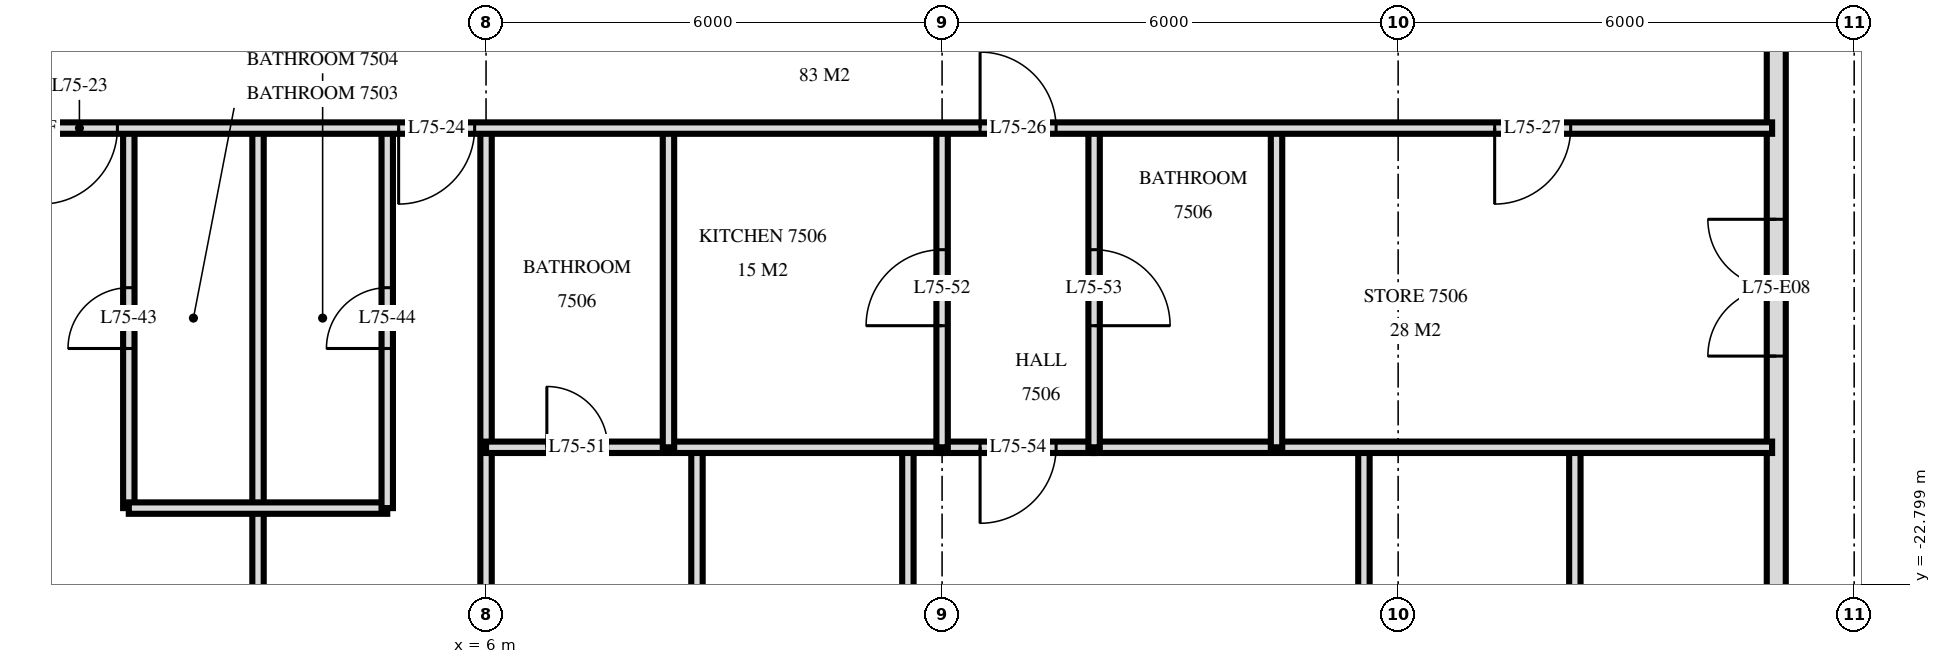
"""IFC4 building model, lengths in metres.
Left out: names, types, materials, properties, quantities, classifications, styles, units other than length and angle.
Written with IfcOpenShell. Run it as: python <this file> out.ifc"""

import sys

from ifc_helpers import new_model, si_unit, direction, frame, frame_2d, origin, place, context, subcontext, project, spatial, rectangle, extrude, element, fill, save


model = new_model("IFC4")
c1 = context("Model", 3, precision=1e-05, world=origin(), true_north=direction((0.0, 1.0)))
c2 = subcontext(c1, "Body", "Model", "MODEL_VIEW")
j1 = project(units=[si_unit("LENGTHUNIT", "METRE"), si_unit("PLANEANGLEUNIT", "RADIAN")], contexts=[c1])
p1 = place(None, origin())
s1 = spatial("IfcSite", under=j1, at=p1, CompositionType="ELEMENT")
p2 = place(p1, origin())
s2 = spatial("IfcBuilding", under=s1, at=p2, CompositionType="ELEMENT")
p3 = place(p2, frame((0.0, 0.0, 284.1)))
s3 = spatial("IfcBuildingStorey", under=s2, at=p3, CompositionType="ELEMENT", Elevation=284.1)
p4 = place(p3, frame((22.975, -29.275, 0.0), z_axis=(0.0, 0.0, 1.0), x_axis=(0.0, 1.0, 0.0)))
e1 = element("IfcWall", 1, at=p4, inside=s3, PredefinedType="SOLIDWALL", context=c2, shape_type="SweptSolid", body=[
    extrude(rectangle(XDim=25.951, YDim=0.25, at=frame_2d((12.975, 0.0))), origin(), (0.0, 0.0, 1.0), 3.22),
])
p5 = place(p4, frame((0.575, 0.0, 0.0)))
e2 = element("IfcOpeningElement", 2, at=p5, cuts=e1, PredefinedType="OPENING", context=c2, shape_type="SweptSolid", body=[
    extrude(rectangle(XDim=1.8, YDim=2.4, at=frame_2d((0.9, 1.2))), frame((0.0, 0.135, 0.0), z_axis=(0.0, -1.0, 0.0), x_axis=(1.0, 0.0, 0.0)), (0.0, 0.0, 1.0), 0.27),
])
p6 = place(p4, frame((3.325, 0.0, 0.9)))
e3 = element("IfcOpeningElement", 3, at=p6, cuts=e1, PredefinedType="OPENING", context=c2, shape_type="SweptSolid", body=[
    extrude(rectangle(XDim=1.8, YDim=1.5, at=frame_2d((0.9, 0.75))), frame((0.0, 0.135, 0.0), z_axis=(0.0, -1.0, 0.0), x_axis=(1.0, 0.0, 0.0)), (0.0, 0.0, 1.0), 0.27),
])
p7 = place(p4, frame((9.475, 0.0, 0.0)))
e4 = element("IfcOpeningElement", 4, at=p7, cuts=e1, PredefinedType="OPENING", context=c2, shape_type="SweptSolid", body=[
    extrude(rectangle(XDim=1.8, YDim=2.4, at=frame_2d((0.9, 1.2))), frame((0.0, 0.135, 0.0), z_axis=(0.0, -1.0, 0.0), x_axis=(1.0, 0.0, 0.0)), (0.0, 0.0, 1.0), 0.27),
])
p8 = place(p4, frame((16.175, 0.0, 0.0)))
e5 = element("IfcOpeningElement", 5, at=p8, cuts=e1, PredefinedType="OPENING", context=c2, shape_type="SweptSolid", body=[
    extrude(rectangle(XDim=1.8, YDim=2.4, at=frame_2d((0.9, 1.2))), frame((0.0, 0.135, 0.0), z_axis=(0.0, -1.0, 0.0), x_axis=(1.0, 0.0, 0.0)), (0.0, 0.0, 1.0), 0.27),
])
p9 = place(p4, frame((22.675, 0.0, 0.0)))
e6 = element("IfcOpeningElement", 6, at=p9, cuts=e1, PredefinedType="OPENING", context=c2, shape_type="SweptSolid", body=[
    extrude(rectangle(XDim=1.8, YDim=2.4, at=frame_2d((0.9, 1.2))), frame((0.0, 0.135, 0.0), z_axis=(0.0, -1.0, 0.0), x_axis=(1.0, 0.0, 0.0)), (0.0, 0.0, 1.0), 0.27),
])
p10 = place(p3, frame((20.325, -33.239, 0.0), z_axis=(0.0, 0.0, 1.0), x_axis=(0.0, 1.0, 0.0)))
e7 = element("IfcWall", 7, at=p10, inside=s3, PredefinedType="PARTITIONING", context=c2, shape_type="SweptSolid", body=[
    extrude(rectangle(XDim=12.239, YDim=0.15, at=frame_2d((6.12, 0.0))), origin(), (0.0, 0.0, 1.0), 3.22),
])
p11 = place(p10, frame((5.569, 0.0, 0.0)))
e8 = element("IfcOpeningElement", 8, at=p11, cuts=e7, PredefinedType="OPENING", context=c2, shape_type="SweptSolid", body=[
    extrude(rectangle(XDim=0.9, YDim=2.1, at=frame_2d((0.45, 1.05))), frame((0.0, 0.085, 0.0), z_axis=(0.0, -1.0, 0.0), x_axis=(1.0, 0.0, 0.0)), (0.0, 0.0, 1.0), 0.17),
])
p12 = place(p3, frame((17.55, -33.62, 0.0), z_axis=(0.0, 0.0, 1.0), x_axis=(0.0, 1.0, 0.0)))
e9 = element("IfcWall", 9, at=p12, inside=s3, PredefinedType="PARTITIONING", context=c2, shape_type="SweptSolid", body=[
    extrude(rectangle(XDim=12.62, YDim=0.15, at=frame_2d((6.31, 0.0))), origin(), (0.0, 0.0, 1.0), 3.22),
])
p13 = place(p12, frame((5.75, 0.0, 0.0)))
e10 = element("IfcOpeningElement", 10, at=p13, cuts=e9, PredefinedType="OPENING", context=c2, shape_type="SweptSolid", body=[
    extrude(rectangle(XDim=0.9, YDim=2.1, at=frame_2d((0.45, 1.05))), frame((0.0, 0.085, 0.0), z_axis=(0.0, -1.0, 0.0), x_axis=(1.0, 0.0, 0.0)), (0.0, 0.0, 1.0), 0.17),
])
p14 = place(p3, frame((16.4, -21.0, 0.0), z_axis=(0.0, 0.0, 1.0), x_axis=(0.0, 1.0, 0.0)))
e11 = element("IfcWall", 11, at=p14, inside=s3, PredefinedType="PARTITIONING", context=c2, shape_type="SweptSolid", body=[
    extrude(rectangle(XDim=4.2, YDim=0.15, at=frame_2d((2.1, 0.0))), origin(), (0.0, 0.0, 1.0), 3.22),
])
p15 = place(p3, frame((14.0, -21.0, 0.0), z_axis=(0.0, 0.0, 1.0), x_axis=(0.0, 1.0, 0.0)))
e12 = element("IfcWall", 12, at=p15, inside=s3, PredefinedType="PARTITIONING", context=c2, shape_type="SweptSolid", body=[
    extrude(rectangle(XDim=4.2, YDim=0.15, at=frame_2d((2.1, 0.0))), origin(), (0.0, 0.0, 1.0), 3.22),
])
p16 = place(p15, frame((1.6, 0.0, 0.0)))
e13 = element("IfcOpeningElement", 13, at=p16, cuts=e12, PredefinedType="OPENING", context=c2, shape_type="SweptSolid", body=[
    extrude(rectangle(XDim=1.0, YDim=2.1, at=frame_2d((0.5, 1.05))), frame((0.0, 0.085, 0.0), z_axis=(0.0, -1.0, 0.0), x_axis=(1.0, 0.0, 0.0)), (0.0, 0.0, 1.0), 0.17),
])
p17 = place(p3, frame((12.0, -21.0, 0.0), z_axis=(0.0, 0.0, 1.0), x_axis=(0.0, 1.0, 0.0)))
e14 = element("IfcWall", 14, at=p17, inside=s3, PredefinedType="PARTITIONING", context=c2, shape_type="SweptSolid", body=[
    extrude(rectangle(XDim=4.2, YDim=0.15, at=frame_2d((2.1, 0.0))), origin(), (0.0, 0.0, 1.0), 3.22),
])
p18 = place(p17, frame((1.6, 0.0, 0.0)))
e15 = element("IfcOpeningElement", 15, at=p18, cuts=e14, PredefinedType="OPENING", context=c2, shape_type="SweptSolid", body=[
    extrude(rectangle(XDim=1.0, YDim=2.1, at=frame_2d((0.5, 1.05))), frame((0.0, 0.085, 0.0), z_axis=(0.0, -1.0, 0.0), x_axis=(1.0, 0.0, 0.0)), (0.0, 0.0, 1.0), 0.17),
])
p19 = place(p3, frame((11.55, -33.62, 0.0), z_axis=(0.0, 0.0, 1.0), x_axis=(0.0, 1.0, 0.0)))
e16 = element("IfcWall", 16, at=p19, inside=s3, PredefinedType="PARTITIONING", context=c2, shape_type="SweptSolid", body=[
    extrude(rectangle(XDim=12.62, YDim=0.15, at=frame_2d((6.31, 0.0))), origin(), (0.0, 0.0, 1.0), 3.22),
])
p20 = place(p19, frame((5.79, 0.0, 0.0)))
e17 = element("IfcOpeningElement", 17, at=p20, cuts=e16, PredefinedType="OPENING", context=c2, shape_type="SweptSolid", body=[
    extrude(rectangle(XDim=0.9, YDim=2.1, at=frame_2d((0.45, 1.05))), frame((0.0, 0.085, 0.0), z_axis=(0.0, -1.0, 0.0), x_axis=(1.0, 0.0, 0.0)), (0.0, 0.0, 1.0), 0.17),
])
p21 = place(p3, frame((8.775, -33.62, 0.0), z_axis=(0.0, 0.0, 1.0), x_axis=(0.0, 1.0, 0.0)))
e18 = element("IfcWall", 18, at=p21, inside=s3, PredefinedType="PARTITIONING", context=c2, shape_type="SweptSolid", body=[
    extrude(rectangle(XDim=12.62, YDim=0.15, at=frame_2d((6.31, 0.0))), origin(), (0.0, 0.0, 1.0), 3.22),
])
p22 = place(p21, frame((5.77, 0.0, 0.0)))
e19 = element("IfcOpeningElement", 19, at=p22, cuts=e18, PredefinedType="OPENING", context=c2, shape_type="SweptSolid", body=[
    extrude(rectangle(XDim=0.9, YDim=2.1, at=frame_2d((0.45, 1.05))), frame((0.0, 0.085, 0.0), z_axis=(0.0, -1.0, 0.0), x_axis=(1.0, 0.0, 0.0)), (0.0, 0.0, 1.0), 0.17),
])
p23 = place(p3, frame((8.4, -21.0, 0.0), z_axis=(0.0, 0.0, 1.0), x_axis=(0.0, 1.0, 0.0)))
e20 = element("IfcWall", 20, at=p23, inside=s3, PredefinedType="PARTITIONING", context=c2, shape_type="SweptSolid", body=[
    extrude(rectangle(XDim=4.2, YDim=0.15, at=frame_2d((2.1, 0.0))), origin(), (0.0, 0.0, 1.0), 3.22),
])
p24 = place(p3, frame((6.0, -33.62, 0.0), z_axis=(0.0, 0.0, 1.0), x_axis=(0.0, 1.0, 0.0)))
e21 = element("IfcWall", 21, at=p24, inside=s3, PredefinedType="PARTITIONING", context=c2, shape_type="SweptSolid", body=[
    extrude(rectangle(XDim=16.82, YDim=0.15, at=frame_2d((8.41, 0.0))), origin(), (0.0, 0.0, 1.0), 3.22),
])
p25 = place(p3, frame((4.7, -21.8, 0.0), z_axis=(0.0, 0.0, 1.0), x_axis=(0.0, 1.0, 0.0)))
e22 = element("IfcWall", 22, at=p25, inside=s3, PredefinedType="PARTITIONING", context=c2, shape_type="SweptSolid", body=[
    extrude(rectangle(XDim=5.0, YDim=0.15, at=frame_2d((2.5, 0.0))), origin(), (0.0, 0.0, 1.0), 3.22),
])
p26 = place(p25, frame((2.1, 0.0, 0.0)))
e23 = element("IfcOpeningElement", 23, at=p26, cuts=e22, PredefinedType="OPENING", context=c2, shape_type="SweptSolid", body=[
    extrude(rectangle(XDim=0.8, YDim=2.1, at=frame_2d((0.4, 1.05))), frame((0.0, 0.085, 0.0), z_axis=(0.0, -1.0, 0.0), x_axis=(1.0, 0.0, 0.0)), (0.0, 0.0, 1.0), 0.17),
])
p27 = place(p3, frame((3.0, -33.62, 0.0), z_axis=(0.0, 0.0, 1.0), x_axis=(0.0, 1.0, 0.0)))
e24 = element("IfcWall", 24, at=p27, inside=s3, PredefinedType="PARTITIONING", context=c2, shape_type="SweptSolid", body=[
    extrude(rectangle(XDim=16.82, YDim=0.15, at=frame_2d((8.41, 0.0))), origin(), (0.0, 0.0, 1.0), 3.22),
])
p28 = place(p3, frame((1.3, -21.8, 0.0), z_axis=(0.0, 0.0, 1.0), x_axis=(0.0, 1.0, 0.0)))
e25 = element("IfcWall", 25, at=p28, inside=s3, PredefinedType="PARTITIONING", context=c2, shape_type="SweptSolid", body=[
    extrude(rectangle(XDim=5.0, YDim=0.15, at=frame_2d((2.5, 0.0))), origin(), (0.0, 0.0, 1.0), 3.22),
])
p29 = place(p28, frame((2.1, 0.0, 0.0)))
e26 = element("IfcOpeningElement", 26, at=p29, cuts=e25, PredefinedType="OPENING", context=c2, shape_type="SweptSolid", body=[
    extrude(rectangle(XDim=0.8, YDim=2.1, at=frame_2d((0.4, 1.05))), frame((0.0, 0.085, 0.0), z_axis=(0.0, -1.0, 0.0), x_axis=(1.0, 0.0, 0.0)), (0.0, 0.0, 1.0), 0.17),
])
p30 = place(p3, frame((1.3, -21.8, 0.0), z_axis=(0.0, 0.0, 1.0), x_axis=(1.0, 0.0, 0.0)))
e27 = element("IfcWall", 27, at=p30, inside=s3, PredefinedType="PARTITIONING", context=c2, shape_type="SweptSolid", body=[
    extrude(rectangle(XDim=3.4, YDim=0.15, at=frame_2d((1.7, 0.0))), origin(), (0.0, 0.0, 1.0), 3.22),
])
p31 = place(p3, frame((12.0, -21.0, 0.0), z_axis=(0.0, 0.0, 1.0), x_axis=(1.0, 0.0, 0.0)))
e28 = element("IfcWall", 28, at=p31, inside=s3, PredefinedType="PARTITIONING", context=c2, shape_type="SweptSolid", body=[
    extrude(rectangle(XDim=2.0, YDim=0.15, at=frame_2d((1.0, 0.0))), origin(), (0.0, 0.0, 1.0), 3.22),
])
p32 = place(p31, frame((0.5, 0.0, 0.0)))
e29 = element("IfcOpeningElement", 29, at=p32, cuts=e28, PredefinedType="OPENING", context=c2, shape_type="SweptSolid", body=[
    extrude(rectangle(XDim=1.0, YDim=2.1, at=frame_2d((0.5, 1.05))), frame((0.0, 0.085, 0.0), z_axis=(0.0, -1.0, 0.0), x_axis=(1.0, 0.0, 0.0)), (0.0, 0.0, 1.0), 0.17),
])
p33 = place(p3, frame((6.0, -21.0, 0.0), z_axis=(0.0, 0.0, 1.0), x_axis=(1.0, 0.0, 0.0)))
e30 = element("IfcWall", 30, at=p33, inside=s3, PredefinedType="PARTITIONING", context=c2, shape_type="SweptSolid", body=[
    extrude(rectangle(XDim=6.0, YDim=0.15, at=frame_2d((3.0, 0.0))), origin(), (0.0, 0.0, 1.0), 3.22),
])
p34 = place(p33, frame((0.8, 0.0, 0.0)))
e31 = element("IfcOpeningElement", 31, at=p34, cuts=e30, PredefinedType="OPENING", context=c2, shape_type="SweptSolid", body=[
    extrude(rectangle(XDim=0.8, YDim=2.1, at=frame_2d((0.4, 1.05))), frame((0.0, 0.085, 0.0), z_axis=(0.0, -1.0, 0.0), x_axis=(1.0, 0.0, 0.0)), (0.0, 0.0, 1.0), 0.17),
])
p35 = place(p3, frame((14.0, -21.0, 0.0), z_axis=(0.0, 0.0, 1.0), x_axis=(1.0, 0.0, 0.0)))
e32 = element("IfcWall", 32, at=p35, inside=s3, PredefinedType="PARTITIONING", context=c2, shape_type="SweptSolid", body=[
    extrude(rectangle(XDim=8.92, YDim=0.15, at=frame_2d((4.46, 0.0))), origin(), (0.0, 0.0, 1.0), 3.22),
])
p36 = place(p3, frame((-22.92, -16.8, 0.0), z_axis=(0.0, 0.0, 1.0), x_axis=(1.0, 0.0, 0.0)))
e33 = element("IfcWall", 33, at=p36, inside=s3, PredefinedType="PARTITIONING", context=c2, shape_type="SweptSolid", body=[
    extrude(rectangle(XDim=45.84, YDim=0.15, at=frame_2d((22.92, 0.0))), origin(), (0.0, 0.0, 1.0), 3.22),
])
p37 = place(p36, frame((16.72, 0.0, 0.0)))
e34 = element("IfcOpeningElement", 34, at=p37, cuts=e33, PredefinedType="OPENING", context=c2, shape_type="SweptSolid", body=[
    extrude(rectangle(XDim=1.0, YDim=2.1, at=frame_2d((0.5, 1.05))), frame((0.0, 0.085, 0.0), z_axis=(0.0, -1.0, 0.0), x_axis=(1.0, 0.0, 0.0)), (0.0, 0.0, 1.0), 0.17),
])
p38 = place(p36, frame((18.52, 0.0, 0.0)))
e35 = element("IfcOpeningElement", 35, at=p38, cuts=e33, PredefinedType="OPENING", context=c2, shape_type="SweptSolid", body=[
    extrude(rectangle(XDim=1.0, YDim=2.1, at=frame_2d((0.5, 1.05))), frame((0.0, 0.085, 0.0), z_axis=(0.0, -1.0, 0.0), x_axis=(1.0, 0.0, 0.0)), (0.0, 0.0, 1.0), 0.17),
])
p39 = place(p36, frame((21.77, 0.0, 0.0)))
e36 = element("IfcOpeningElement", 36, at=p39, cuts=e33, PredefinedType="OPENING", context=c2, shape_type="SweptSolid", body=[
    extrude(rectangle(XDim=1.0, YDim=2.1, at=frame_2d((0.5, 1.05))), frame((0.0, 0.085, 0.0), z_axis=(0.0, -1.0, 0.0), x_axis=(1.0, 0.0, 0.0)), (0.0, 0.0, 1.0), 0.17),
])
p40 = place(p36, frame((23.07, 0.0, 0.0)))
e37 = element("IfcOpeningElement", 37, at=p40, cuts=e33, PredefinedType="OPENING", context=c2, shape_type="SweptSolid", body=[
    extrude(rectangle(XDim=1.0, YDim=2.1, at=frame_2d((0.5, 1.05))), frame((0.0, 0.085, 0.0), z_axis=(0.0, -1.0, 0.0), x_axis=(1.0, 0.0, 0.0)), (0.0, 0.0, 1.0), 0.17),
])
p41 = place(p36, frame((27.77, 0.0, 0.0)))
e38 = element("IfcOpeningElement", 38, at=p41, cuts=e33, PredefinedType="OPENING", context=c2, shape_type="SweptSolid", body=[
    extrude(rectangle(XDim=1.0, YDim=2.1, at=frame_2d((0.5, 1.05))), frame((0.0, 0.085, 0.0), z_axis=(0.0, -1.0, 0.0), x_axis=(1.0, 0.0, 0.0)), (0.0, 0.0, 1.0), 0.17),
])
p42 = place(p36, frame((7.02, 0.0, 0.0)))
e39 = element("IfcOpeningElement", 39, at=p42, cuts=e33, PredefinedType="OPENING", context=c2, shape_type="SweptSolid", body=[
    extrude(rectangle(XDim=1.0, YDim=2.1, at=frame_2d((0.5, 1.05))), frame((0.0, 0.085, 0.0), z_axis=(0.0, -1.0, 0.0), x_axis=(1.0, 0.0, 0.0)), (0.0, 0.0, 1.0), 0.17),
])
p43 = place(p36, frame((35.42, 0.0, 0.0)))
e40 = element("IfcOpeningElement", 40, at=p43, cuts=e33, PredefinedType="OPENING", context=c2, shape_type="SweptSolid", body=[
    extrude(rectangle(XDim=1.0, YDim=2.1, at=frame_2d((0.5, 1.05))), frame((0.0, 0.085, 0.0), z_axis=(0.0, -1.0, 0.0), x_axis=(1.0, 0.0, 0.0)), (0.0, 0.0, 1.0), 0.17),
])
p44 = place(p36, frame((42.19, 0.0, 0.0)))
e41 = element("IfcOpeningElement", 41, at=p44, cuts=e33, PredefinedType="OPENING", context=c2, shape_type="SweptSolid", body=[
    extrude(rectangle(XDim=1.0, YDim=2.1, at=frame_2d((0.5, 1.05))), frame((0.0, 0.085, 0.0), z_axis=(0.0, -1.0, 0.0), x_axis=(1.0, 0.0, 0.0)), (0.0, 0.0, 1.0), 0.17),
])
p45 = place(p7, origin())
e42 = element("IfcDoor", 42, at=p45, inside=s3, OperationType="DOUBLE_DOOR_SINGLE_SWING", PredefinedType="DOOR", context=c2, shape_type="SweptSolid", body=[
    extrude(rectangle(XDim=1.8, YDim=2.4, at=frame_2d((0.9, 1.2))), frame((0.0, 0.025, 0.0), z_axis=(0.0, -1.0, 0.0), x_axis=(1.0, 0.0, 0.0)), (0.0, 0.0, 1.0), 0.05),
])
fill(e4, e42)
p46 = place(p40, frame((0.5, 0.0, 0.0), z_axis=(0.0, 0.0, 1.0), x_axis=(-1.0, 0.0, 0.0)))
e43 = element("IfcDoor", 43, at=p46, inside=s3, OperationType="SINGLE_SWING_LEFT", PredefinedType="DOOR", context=c2, shape_type="SweptSolid", body=[
    extrude(rectangle(XDim=1.0, YDim=2.1, at=frame_2d((0.0, 1.05))), frame((0.0, -0.025, 0.0), z_axis=(0.0, 1.0, 0.0), x_axis=(-1.0, 0.0, 0.0)), (0.0, 0.0, 1.0), 0.05),
])
fill(e37, e43)
p47 = place(p41, frame((0.5, 0.0, 0.0), z_axis=(0.0, 0.0, 1.0), x_axis=(-1.0, 0.0, 0.0)))
e44 = element("IfcDoor", 44, at=p47, inside=s3, OperationType="SINGLE_SWING_LEFT", PredefinedType="DOOR", context=c2, shape_type="SweptSolid", body=[
    extrude(rectangle(XDim=1.0, YDim=2.1, at=frame_2d((0.0, 1.05))), frame((0.0, -0.025, 0.0), z_axis=(0.0, 1.0, 0.0), x_axis=(-1.0, 0.0, 0.0)), (0.0, 0.0, 1.0), 0.05),
])
fill(e38, e44)
p48 = place(p43, origin())
e45 = element("IfcDoor", 45, at=p48, inside=s3, OperationType="SINGLE_SWING_RIGHT", PredefinedType="DOOR", context=c2, shape_type="SweptSolid", body=[
    extrude(rectangle(XDim=1.0, YDim=2.1, at=frame_2d((0.5, 1.05))), frame((0.0, 0.025, 0.0), z_axis=(0.0, -1.0, 0.0), x_axis=(1.0, 0.0, 0.0)), (0.0, 0.0, 1.0), 0.05),
])
fill(e40, e45)
p49 = place(p44, frame((0.5, 0.0, 0.0), z_axis=(0.0, 0.0, 1.0), x_axis=(-1.0, 0.0, 0.0)))
e46 = element("IfcDoor", 46, at=p49, inside=s3, OperationType="SINGLE_SWING_LEFT", PredefinedType="DOOR", context=c2, shape_type="SweptSolid", body=[
    extrude(rectangle(XDim=1.0, YDim=2.1, at=frame_2d((0.0, 1.05))), frame((0.0, -0.025, 0.0), z_axis=(0.0, 1.0, 0.0), x_axis=(-1.0, 0.0, 0.0)), (0.0, 0.0, 1.0), 0.05),
])
fill(e41, e46)
p50 = place(p29, origin())
e47 = element("IfcDoor", 47, at=p50, inside=s3, OperationType="SINGLE_SWING_RIGHT", PredefinedType="DOOR", context=c2, shape_type="SweptSolid", body=[
    extrude(rectangle(XDim=0.8, YDim=2.1, at=frame_2d((0.4, 1.05))), frame((0.0, 0.025, 0.0), z_axis=(0.0, -1.0, 0.0), x_axis=(1.0, 0.0, 0.0)), (0.0, 0.0, 1.0), 0.05),
])
fill(e26, e47)
p51 = place(p26, origin())
e48 = element("IfcDoor", 48, at=p51, inside=s3, OperationType="SINGLE_SWING_RIGHT", PredefinedType="DOOR", context=c2, shape_type="SweptSolid", body=[
    extrude(rectangle(XDim=0.8, YDim=2.1, at=frame_2d((0.4, 1.05))), frame((0.0, 0.025, 0.0), z_axis=(0.0, -1.0, 0.0), x_axis=(1.0, 0.0, 0.0)), (0.0, 0.0, 1.0), 0.05),
])
fill(e23, e48)
p52 = place(p34, origin())
e49 = element("IfcDoor", 49, at=p52, inside=s3, OperationType="SINGLE_SWING_RIGHT", PredefinedType="DOOR", context=c2, shape_type="SweptSolid", body=[
    extrude(rectangle(XDim=0.8, YDim=2.1, at=frame_2d((0.4, 1.05))), frame((0.0, 0.025, 0.0), z_axis=(0.0, -1.0, 0.0), x_axis=(1.0, 0.0, 0.0)), (0.0, 0.0, 1.0), 0.05),
])
fill(e31, e49)
p53 = place(p18, origin())
e50 = element("IfcDoor", 50, at=p53, inside=s3, OperationType="SINGLE_SWING_RIGHT", PredefinedType="DOOR", context=c2, shape_type="SweptSolid", body=[
    extrude(rectangle(XDim=1.0, YDim=2.1, at=frame_2d((0.5, 1.05))), frame((0.0, 0.025, 0.0), z_axis=(0.0, -1.0, 0.0), x_axis=(1.0, 0.0, 0.0)), (0.0, 0.0, 1.0), 0.05),
])
fill(e15, e50)
p54 = place(p16, frame((0.5, 0.0, 0.0), z_axis=(0.0, 0.0, 1.0), x_axis=(-1.0, 0.0, 0.0)))
e51 = element("IfcDoor", 51, at=p54, inside=s3, OperationType="SINGLE_SWING_LEFT", PredefinedType="DOOR", context=c2, shape_type="SweptSolid", body=[
    extrude(rectangle(XDim=1.0, YDim=2.1, at=frame_2d((0.0, 1.05))), frame((0.0, -0.025, 0.0), z_axis=(0.0, 1.0, 0.0), x_axis=(-1.0, 0.0, 0.0)), (0.0, 0.0, 1.0), 0.05),
])
fill(e13, e51)
p55 = place(p32, frame((0.5, 0.0, 0.0), z_axis=(0.0, 0.0, 1.0), x_axis=(-1.0, 0.0, 0.0)))
e52 = element("IfcDoor", 52, at=p55, inside=s3, OperationType="SINGLE_SWING_LEFT", PredefinedType="DOOR", context=c2, shape_type="SweptSolid", body=[
    extrude(rectangle(XDim=1.0, YDim=2.1, at=frame_2d((0.0, 1.05))), frame((0.0, -0.025, 0.0), z_axis=(0.0, 1.0, 0.0), x_axis=(-1.0, 0.0, 0.0)), (0.0, 0.0, 1.0), 0.05),
])
fill(e29, e52)
save(model, sys.argv[1])
